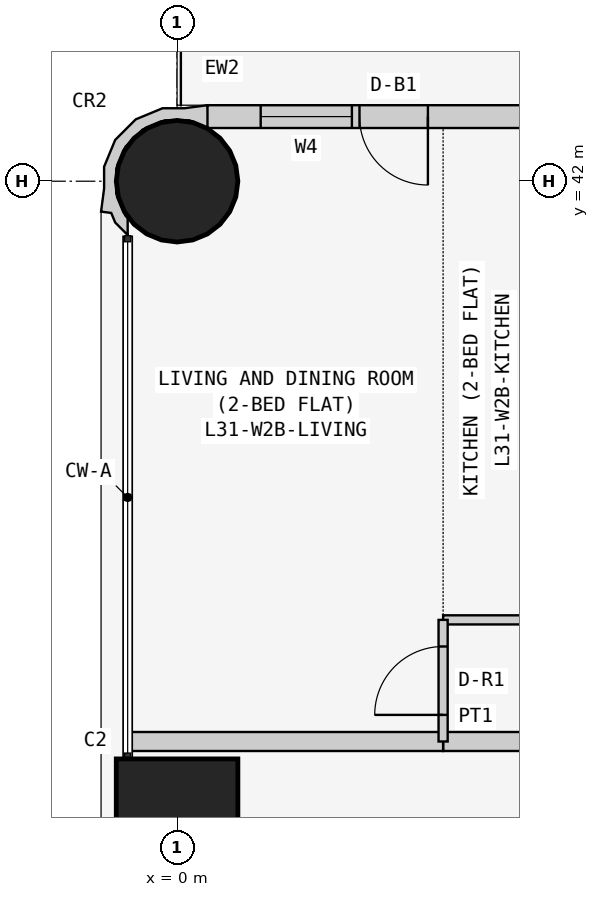
"""IFC4 building model, lengths in metres.
Left out: names, types, materials, properties, quantities, classifications, styles, units other than length and angle.
Written with IfcOpenShell. Run it as: python <this file> out.ifc"""

import sys

from ifc_helpers import new_model, si_unit, direction, frame, frame_2d, origin, origin_2d, place, context, subcontext, project, spatial, polyline, rectangle, circle, outline, extrude, element, fill, save


model = new_model("IFC4")
c1 = context("Model", 3, precision=1e-05, world=origin(), true_north=direction((0.0, 1.0)))
c2 = subcontext(c1, "Body", "Model", "MODEL_VIEW")
j1 = project(units=[si_unit("LENGTHUNIT", "METRE"), si_unit("PLANEANGLEUNIT", "RADIAN")], contexts=[c1])
p1 = place(None, origin())
s1 = spatial("IfcSite", under=j1, at=p1, CompositionType="ELEMENT")
p2 = place(p1, origin())
s2 = spatial("IfcBuilding", under=s1, at=p2, CompositionType="ELEMENT")
p3 = place(p2, frame((0.0, 0.0, 123.3)))
s3 = spatial("IfcBuildingStorey", under=s2, at=p3, CompositionType="ELEMENT", Elevation=123.3)
p4 = place(p3, frame((0.0, 33.6, 0.0), z_axis=(0.0, 0.0, 1.0), x_axis=(1.0, 0.0, 0.0)))
e1 = element("IfcColumn", 1, at=p4, inside=s3, PredefinedType="COLUMN", context=c2, shape_type="SweptSolid", body=[
    extrude(rectangle(XDim=1.6, YDim=1.6, at=origin_2d()), origin(), (0.0, 0.0, 1.0), 3.6),
])
p5 = place(p3, frame((0.0, 42.0, 0.0), z_axis=(0.0, 0.0, 1.0), x_axis=(1.0, 0.0, 0.0)))
e2 = element("IfcColumn", 2, at=p5, inside=s3, PredefinedType="COLUMN", context=c2, shape_type="SweptSolid", body=[
    extrude(circle(Radius=0.8, at=origin_2d()), origin(), (0.0, 0.0, 1.0), 3.6),
])
p6 = place(p3, frame((15.8, 42.85, 0.0), z_axis=(0.0, 0.0, 1.0), x_axis=(-1.0, 0.0, 0.0)))
e3 = element("IfcWall", 3, at=p6, inside=s3, PredefinedType="SOLIDWALL", context=c2, shape_type="SweptSolid", body=[
    extrude(rectangle(XDim=15.4, YDim=0.3, at=frame_2d((7.7, 0.0))), origin(), (0.0, 0.0, 1.0), 3.45),
])
p7 = place(p6, frame((1.2, 0.0, 0.9)))
e4 = element("IfcOpeningElement", 4, at=p7, cuts=e3, PredefinedType="OPENING", context=c2, shape_type="SweptSolid", body=[
    extrude(rectangle(XDim=1.8, YDim=1.5, at=frame_2d((0.9, 0.75))), frame((0.0, 0.16, 0.0), z_axis=(0.0, -1.0, 0.0), x_axis=(1.0, 0.0, 0.0)), (0.0, 0.0, 1.0), 0.32),
])
p8 = place(p6, frame((4.95, 0.0, 1.5)))
e5 = element("IfcOpeningElement", 5, at=p8, cuts=e3, PredefinedType="OPENING", context=c2, shape_type="SweptSolid", body=[
    extrude(rectangle(XDim=0.9, YDim=0.7, at=frame_2d((0.45, 0.35))), frame((0.0, 0.16, 0.0), z_axis=(0.0, -1.0, 0.0), x_axis=(1.0, 0.0, 0.0)), (0.0, 0.0, 1.0), 0.32),
])
p9 = place(p6, frame((8.5, 0.0, 0.9)))
e6 = element("IfcOpeningElement", 6, at=p9, cuts=e3, PredefinedType="OPENING", context=c2, shape_type="SweptSolid", body=[
    extrude(rectangle(XDim=1.8, YDim=1.5, at=frame_2d((0.9, 0.75))), frame((0.0, 0.16, 0.0), z_axis=(0.0, -1.0, 0.0), x_axis=(1.0, 0.0, 0.0)), (0.0, 0.0, 1.0), 0.32),
])
p10 = place(p6, frame((12.5, 0.0, 0.0)))
e7 = element("IfcOpeningElement", 7, at=p10, cuts=e3, PredefinedType="OPENING", context=c2, shape_type="SweptSolid", body=[
    extrude(rectangle(XDim=0.9, YDim=2.4, at=frame_2d((0.45, 1.2))), frame((0.0, 0.16, 0.0), z_axis=(0.0, -1.0, 0.0), x_axis=(1.0, 0.0, 0.0)), (0.0, 0.0, 1.0), 0.32),
])
p11 = place(p6, frame((13.5, 0.0, 0.9)))
e8 = element("IfcOpeningElement", 8, at=p11, cuts=e3, PredefinedType="OPENING", context=c2, shape_type="SweptSolid", body=[
    extrude(rectangle(XDim=1.2, YDim=1.5, at=frame_2d((0.6, 0.75))), frame((0.0, 0.16, 0.0), z_axis=(0.0, -1.0, 0.0), x_axis=(1.0, 0.0, 0.0)), (0.0, 0.0, 1.0), 0.32),
])
p12 = place(p3, frame((0.327, 42.817, 0.0), z_axis=(0.0, 0.0, 1.0), x_axis=(-0.93923434088, 0.343276641956, 0.0)))
e9 = element("IfcWall", 9, at=p12, inside=s3, PredefinedType="SOLIDWALL", context=c2, shape_type="SweptSolid", body=[
    extrude(outline(polyline([(-0.006, -0.197), (0.266, -0.055), (0.535, 0.044), (0.816, 0.302), (0.977, 0.648), (0.994, 1.03), (0.895, 1.299), (0.828, 1.598), (0.697, 1.569), (0.604, 1.67), (0.394, 1.767), (0.471, 1.556), (0.509, 1.539), (0.724, 1.304), (0.833, 1.005), (0.82, 0.687), (0.686, 0.397), (0.451, 0.182), (0.152, 0.073), (-0.116, 0.084), (-0.127, 0.078), (-0.146, 0.071), (-0.006, -0.197)])), origin(), (0.0, 0.0, 1.0), 3.45),
])
p13 = place(p3, frame((3.5, 34.629, 0.0), z_axis=(0.0, 0.0, 1.0), x_axis=(1.0, 0.0, 0.0)))
e10 = element("IfcWall", 10, at=p13, inside=s3, PredefinedType="PARTITIONING", context=c2, shape_type="SweptSolid", body=[
    extrude(rectangle(XDim=6.3, YDim=0.25, at=frame_2d((3.15, 0.0))), origin(), (0.0, 0.0, 1.0), 3.45),
])
p14 = place(p3, frame((-0.65, 34.629, 0.0), z_axis=(0.0, 0.0, 1.0), x_axis=(1.0, 0.0, 0.0)))
e11 = element("IfcWall", 11, at=p14, inside=s3, PredefinedType="PARTITIONING", context=c2, shape_type="SweptSolid", body=[
    extrude(rectangle(XDim=4.15, YDim=0.25, at=frame_2d((2.075, 0.0))), origin(), (0.0, 0.0, 1.0), 3.45),
])
p15 = place(p3, frame((3.5, 36.229, 0.0), z_axis=(0.0, 0.0, 1.0), x_axis=(1.0, 0.0, 0.0)))
e12 = element("IfcWall", 12, at=p15, inside=s3, PredefinedType="PARTITIONING", context=c2, shape_type="SweptSolid", body=[
    extrude(rectangle(XDim=1.2, YDim=0.12, at=frame_2d((0.6, 0.0))), origin(), (0.0, 0.0, 1.0), 3.45),
])
p16 = place(p3, frame((3.5, 34.629, 0.0), z_axis=(0.0, 0.0, 1.0), x_axis=(0.0, 1.0, 0.0)))
e13 = element("IfcWall", 13, at=p16, inside=s3, PredefinedType="PARTITIONING", context=c2, shape_type="SweptSolid", body=[
    extrude(rectangle(XDim=1.6, YDim=0.12, at=frame_2d((0.8, 0.0))), origin(), (0.0, 0.0, 1.0), 3.45),
])
p17 = place(p16, frame((0.35, 0.0, 0.0)))
e14 = element("IfcOpeningElement", 14, at=p17, cuts=e13, PredefinedType="OPENING", context=c2, shape_type="SweptSolid", body=[
    extrude(rectangle(XDim=0.9, YDim=2.1, at=frame_2d((0.45, 1.05))), frame((0.0, 0.07, 0.0), z_axis=(0.0, -1.0, 0.0), x_axis=(1.0, 0.0, 0.0)), (0.0, 0.0, 1.0), 0.14),
])
p18 = place(p10, origin())
e15 = element("IfcDoor", 15, at=p18, inside=s3, OperationType="SINGLE_SWING_LEFT", PredefinedType="DOOR", context=c2, shape_type="SweptSolid", body=[
    extrude(rectangle(XDim=0.9, YDim=2.4, at=frame_2d((0.45, 1.2))), frame((0.0, 0.025, 0.0), z_axis=(0.0, -1.0, 0.0), x_axis=(1.0, 0.0, 0.0)), (0.0, 0.0, 1.0), 0.05),
])
fill(e7, e15)
p19 = place(p11, origin())
e16 = element("IfcWindow", 16, at=p19, inside=s3, PartitioningType="SINGLE_PANEL", PredefinedType="WINDOW", context=c2, shape_type="SweptSolid", body=[
    extrude(rectangle(XDim=1.2, YDim=1.5, at=frame_2d((0.6, 0.75))), frame((0.0, 0.03, 0.0), z_axis=(0.0, -1.0, 0.0), x_axis=(1.0, 0.0, 0.0)), (0.0, 0.0, 1.0), 0.06),
])
fill(e8, e16)
p20 = place(p17, origin())
e17 = element("IfcDoor", 17, at=p20, inside=s3, OperationType="SINGLE_SWING_LEFT", PredefinedType="DOOR", context=c2, shape_type="SweptSolid", body=[
    extrude(rectangle(XDim=0.9, YDim=2.1, at=frame_2d((0.45, 1.05))), frame((0.0, 0.025, 0.0), z_axis=(0.0, -1.0, 0.0), x_axis=(1.0, 0.0, 0.0)), (0.0, 0.0, 1.0), 0.05),
])
fill(e14, e17)
save(model, sys.argv[1])
